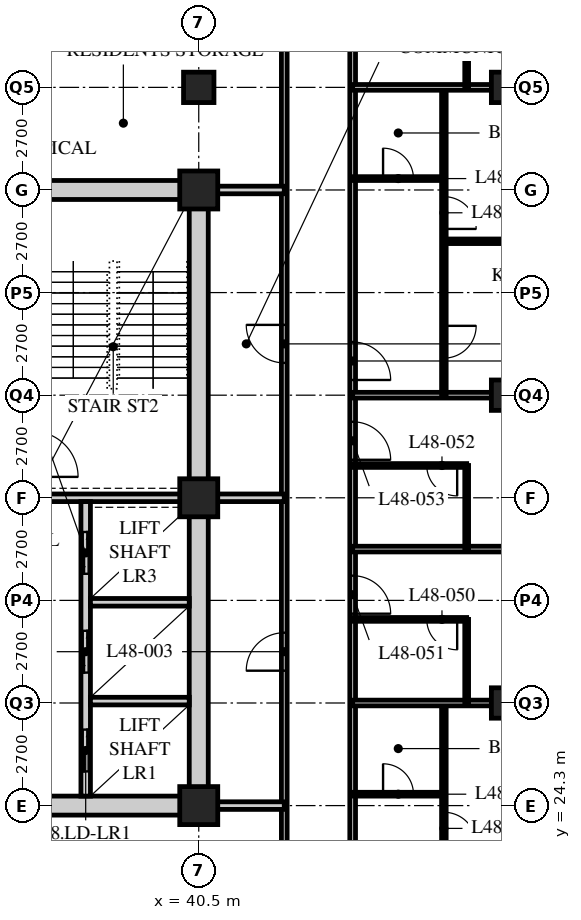
"""IFC4 building model, lengths in metres.
Left out: names, types, materials, properties, quantities, classifications, styles, units other than length and angle.
Written with IfcOpenShell. Run it as: python <this file> out.ifc"""

import sys

from ifc_helpers import new_model, si_unit, direction, frame, frame_2d, origin, origin_2d, place, context, subcontext, project, spatial, rectangle, hollow_rectangle, extrude, element, fill, save


model = new_model("IFC4")
c1 = context("Model", 3, precision=1e-05, world=origin(), true_north=direction((0.0, 1.0)))
c2 = subcontext(c1, "Body", "Model", "MODEL_VIEW")
j1 = project(units=[si_unit("LENGTHUNIT", "METRE"), si_unit("PLANEANGLEUNIT", "RADIAN")], contexts=[c1])
p1 = place(None, origin())
s1 = spatial("IfcSite", under=j1, at=p1, CompositionType="ELEMENT")
p2 = place(p1, origin())
s2 = spatial("IfcBuilding", under=s1, at=p2, CompositionType="ELEMENT")
p3 = place(p2, frame((0.0, 0.0, 188.4)))
s3 = spatial("IfcBuildingStorey", under=s2, at=p3, CompositionType="ELEMENT", Elevation=188.4)
for number, where, z_axis, x_axis in (
    (1, (40.5, 24.3, 0.0), (0.0, 0.0, 1.0), (1.0, 0.0, 0.0)),
    (2, (40.5, 32.4, 0.0), (0.0, 0.0, 1.0), (1.0, 0.0, 0.0)),
    (3, (40.5, 40.5, 0.0), (0.0, 0.0, 1.0), (1.0, 0.0, 0.0)),
):
    element("IfcColumn", number, at=place(p3, frame(where, z_axis=z_axis, x_axis=x_axis)), inside=s3, PredefinedType="COLUMN", context=c2, shape_type="SweptSolid", body=[
        extrude(hollow_rectangle(XDim=1.0, YDim=1.0, WallThickness=0.1, at=origin_2d()), origin(), (0.0, 0.0, 1.0), 3.6),
    ])
for number, where, z_axis, x_axis in (
    (4, (40.5, 43.2, 0.0), (0.0, 0.0, 1.0), (1.0, 0.0, 0.0)),
    (5, (48.6, 27.0, 0.0), (0.0, 0.0, 1.0), (1.0, 0.0, 0.0)),
    (6, (48.6, 35.1, 0.0), (0.0, 0.0, 1.0), (1.0, 0.0, 0.0)),
    (7, (48.6, 43.2, 0.0), (0.0, 0.0, 1.0), (1.0, 0.0, 0.0)),
):
    element("IfcColumn", number, at=place(p3, frame(where, z_axis=z_axis, x_axis=x_axis)), inside=s3, PredefinedType="COLUMN", context=c2, shape_type="SweptSolid", body=[
        extrude(hollow_rectangle(XDim=0.8, YDim=0.8, WallThickness=0.08, at=origin_2d()), origin(), (0.0, 0.0, 1.0), 3.6),
    ])
p4 = place(p3, frame((44.55, 18.9, 0.0), z_axis=(0.0, 0.0, 1.0), x_axis=(0.0, 1.0, 0.0)))
e8 = element("IfcWall", 8, at=p4, inside=s3, PredefinedType="PARTITIONING", context=c2, shape_type="SweptSolid", body=[
    extrude(rectangle(XDim=28.35, YDim=0.15, at=frame_2d((14.175, 0.0))), origin(), (0.0, 0.0, 1.0), 3.39),
])
p5 = place(p4, frame((0.4, 0.0, 0.0)))
e9 = element("IfcOpeningElement", 9, at=p5, cuts=e8, PredefinedType="OPENING", context=c2, shape_type="SweptSolid", body=[
    extrude(rectangle(XDim=1.0, YDim=2.1, at=frame_2d((0.5, 1.05))), frame((0.0, 0.085, 0.0), z_axis=(0.0, -1.0, 0.0), x_axis=(1.0, 0.0, 0.0)), (0.0, 0.0, 1.0), 0.17),
])
p6 = place(p4, frame((10.45, 0.0, 0.0)))
e10 = element("IfcOpeningElement", 10, at=p6, cuts=e8, PredefinedType="OPENING", context=c2, shape_type="SweptSolid", body=[
    extrude(rectangle(XDim=1.0, YDim=2.1, at=frame_2d((0.5, 1.05))), frame((0.0, 0.085, 0.0), z_axis=(0.0, -1.0, 0.0), x_axis=(1.0, 0.0, 0.0)), (0.0, 0.0, 1.0), 0.17),
])
p7 = place(p4, frame((14.5, 0.0, 0.0)))
e11 = element("IfcOpeningElement", 11, at=p7, cuts=e8, PredefinedType="OPENING", context=c2, shape_type="SweptSolid", body=[
    extrude(rectangle(XDim=1.0, YDim=2.1, at=frame_2d((0.5, 1.05))), frame((0.0, 0.085, 0.0), z_axis=(0.0, -1.0, 0.0), x_axis=(1.0, 0.0, 0.0)), (0.0, 0.0, 1.0), 0.17),
])
p8 = place(p4, frame((16.6, 0.0, 0.0)))
e12 = element("IfcOpeningElement", 12, at=p8, cuts=e8, PredefinedType="OPENING", context=c2, shape_type="SweptSolid", body=[
    extrude(rectangle(XDim=1.0, YDim=2.1, at=frame_2d((0.5, 1.05))), frame((0.0, 0.085, 0.0), z_axis=(0.0, -1.0, 0.0), x_axis=(1.0, 0.0, 0.0)), (0.0, 0.0, 1.0), 0.17),
])
p9 = place(p4, frame((26.65, 0.0, 0.0)))
e13 = element("IfcOpeningElement", 13, at=p9, cuts=e8, PredefinedType="OPENING", context=c2, shape_type="SweptSolid", body=[
    extrude(rectangle(XDim=1.0, YDim=2.1, at=frame_2d((0.5, 1.05))), frame((0.0, 0.085, 0.0), z_axis=(0.0, -1.0, 0.0), x_axis=(1.0, 0.0, 0.0)), (0.0, 0.0, 1.0), 0.17),
])
p10 = place(p3, frame((42.75, 20.7, 0.0), z_axis=(0.0, 0.0, 1.0), x_axis=(0.0, 1.0, 0.0)))
e14 = element("IfcWall", 14, at=p10, inside=s3, PredefinedType="PARTITIONING", context=c2, shape_type="SweptSolid", body=[
    extrude(rectangle(XDim=24.75, YDim=0.15, at=frame_2d((12.375, 0.0))), origin(), (0.0, 0.0, 1.0), 3.39),
])
p11 = place(p10, frame((7.15, 0.0, 0.0)))
e15 = element("IfcOpeningElement", 15, at=p11, cuts=e14, PredefinedType="OPENING", context=c2, shape_type="SweptSolid", body=[
    extrude(rectangle(XDim=1.0, YDim=2.1, at=frame_2d((0.5, 1.05))), frame((0.0, 0.085, 0.0), z_axis=(0.0, -1.0, 0.0), x_axis=(1.0, 0.0, 0.0)), (0.0, 0.0, 1.0), 0.17),
])
p12 = place(p10, frame((15.25, 0.0, 0.0)))
e16 = element("IfcOpeningElement", 16, at=p12, cuts=e14, PredefinedType="OPENING", context=c2, shape_type="SweptSolid", body=[
    extrude(rectangle(XDim=1.0, YDim=2.1, at=frame_2d((0.5, 1.05))), frame((0.0, 0.085, 0.0), z_axis=(0.0, -1.0, 0.0), x_axis=(1.0, 0.0, 0.0)), (0.0, 0.0, 1.0), 0.17),
])
for number, where, z_axis, x_axis in (
    (17, (40.5, 32.4, 0.0), (0.0, 0.0, 1.0), (1.0, 0.0, 0.0)),
    (18, (40.5, 24.3, 0.0), (0.0, 0.0, 1.0), (1.0, 0.0, 0.0)),
    (19, (40.5, 40.5, 0.0), (0.0, 0.0, 1.0), (1.0, 0.0, 0.0)),
):
    element("IfcWall", number, at=place(p3, frame(where, z_axis=z_axis, x_axis=x_axis)), inside=s3, PredefinedType="SOLIDWALL", context=c2, shape_type="SweptSolid", body=[
        extrude(rectangle(XDim=2.25, YDim=0.2, at=frame_2d((1.125, 0.0))), origin(), (0.0, 0.0, 1.0), 3.39),
    ])
p13 = place(p3, frame((46.95, 18.9, 0.0), z_axis=(0.0, 0.0, 1.0), x_axis=(0.0, 1.0, 0.0)))
e20 = element("IfcWall", 20, at=p13, inside=s3, PredefinedType="PARTITIONING", context=c2, shape_type="SweptSolid", body=[
    extrude(rectangle(XDim=8.1, YDim=0.12, at=frame_2d((4.05, 0.0))), origin(), (0.0, 0.0, 1.0), 3.39),
])
p14 = place(p13, frame((0.975, 0.0, 0.0)))
e21 = element("IfcOpeningElement", 21, at=p14, cuts=e20, PredefinedType="OPENING", context=c2, shape_type="SweptSolid", body=[
    extrude(rectangle(XDim=0.85, YDim=2.1, at=frame_2d((0.425, 1.05))), frame((0.0, 0.07, 0.0), z_axis=(0.0, -1.0, 0.0), x_axis=(1.0, 0.0, 0.0)), (0.0, 0.0, 1.0), 0.14),
])
p15 = place(p13, frame((4.375, 0.0, 0.0)))
e22 = element("IfcOpeningElement", 22, at=p15, cuts=e20, PredefinedType="OPENING", context=c2, shape_type="SweptSolid", body=[
    extrude(rectangle(XDim=0.85, YDim=2.1, at=frame_2d((0.425, 1.05))), frame((0.0, 0.07, 0.0), z_axis=(0.0, -1.0, 0.0), x_axis=(1.0, 0.0, 0.0)), (0.0, 0.0, 1.0), 0.14),
])
p16 = place(p3, frame((44.55, 24.6, 0.0), z_axis=(0.0, 0.0, 1.0), x_axis=(1.0, 0.0, 0.0)))
e23 = element("IfcWall", 23, at=p16, inside=s3, PredefinedType="PARTITIONING", context=c2, shape_type="SweptSolid", body=[
    extrude(rectangle(XDim=2.4, YDim=0.1, at=frame_2d((1.2, 0.0))), origin(), (0.0, 0.0, 1.0), 3.39),
])
p17 = place(p16, frame((0.8, 0.0, 0.0)))
e24 = element("IfcOpeningElement", 24, at=p17, cuts=e23, PredefinedType="OPENING", context=c2, shape_type="SweptSolid", body=[
    extrude(rectangle(XDim=0.8, YDim=2.1, at=frame_2d((0.4, 1.05))), frame((0.0, 0.06, 0.0), z_axis=(0.0, -1.0, 0.0), x_axis=(1.0, 0.0, 0.0)), (0.0, 0.0, 1.0), 0.12),
])
p18 = place(p3, frame((44.55, 27.0, 0.0), z_axis=(0.0, 0.0, 1.0), x_axis=(1.0, 0.0, 0.0)))
e25 = element("IfcWall", 25, at=p18, inside=s3, PredefinedType="PARTITIONING", context=c2, shape_type="SweptSolid", body=[
    extrude(rectangle(XDim=11.85, YDim=0.15, at=frame_2d((5.925, 0.0))), origin(), (0.0, 0.0, 1.0), 2.778),
])
p19 = place(p3, frame((47.55, 27.0, 0.0), z_axis=(0.0, 0.0, 1.0), x_axis=(0.0, 1.0, 0.0)))
e26 = element("IfcWall", 26, at=p19, inside=s3, PredefinedType="PARTITIONING", context=c2, shape_type="SweptSolid", body=[
    extrude(rectangle(XDim=2.2, YDim=0.1, at=frame_2d((1.1, 0.0))), origin(), (0.0, 0.0, 1.0), 3.39),
])
p20 = place(p3, frame((44.55, 29.2, 0.0), z_axis=(0.0, 0.0, 1.0), x_axis=(1.0, 0.0, 0.0)))
e27 = element("IfcWall", 27, at=p20, inside=s3, PredefinedType="PARTITIONING", context=c2, shape_type="SweptSolid", body=[
    extrude(rectangle(XDim=3.0, YDim=0.1, at=frame_2d((1.5, 0.0))), origin(), (0.0, 0.0, 1.0), 3.39),
])
p21 = place(p20, frame((1.95, 0.0, 0.0)))
e28 = element("IfcOpeningElement", 28, at=p21, cuts=e27, PredefinedType="OPENING", context=c2, shape_type="SweptSolid", body=[
    extrude(rectangle(XDim=0.8, YDim=2.1, at=frame_2d((0.4, 1.05))), frame((0.0, 0.06, 0.0), z_axis=(0.0, -1.0, 0.0), x_axis=(1.0, 0.0, 0.0)), (0.0, 0.0, 1.0), 0.12),
])
p22 = place(p3, frame((44.55, 31.05, 0.0), z_axis=(0.0, 0.0, 1.0), x_axis=(1.0, 0.0, 0.0)))
e29 = element("IfcWall", 29, at=p22, inside=s3, PredefinedType="PARTITIONING", context=c2, shape_type="SweptSolid", body=[
    extrude(rectangle(XDim=11.85, YDim=0.15, at=frame_2d((5.925, 0.0))), origin(), (0.0, 0.0, 1.0), 3.39),
])
p23 = place(p3, frame((47.55, 31.05, 0.0), z_axis=(0.0, 0.0, 1.0), x_axis=(0.0, 1.0, 0.0)))
e30 = element("IfcWall", 30, at=p23, inside=s3, PredefinedType="PARTITIONING", context=c2, shape_type="SweptSolid", body=[
    extrude(rectangle(XDim=2.2, YDim=0.1, at=frame_2d((1.1, 0.0))), origin(), (0.0, 0.0, 1.0), 3.39),
])
p24 = place(p3, frame((44.55, 33.25, 0.0), z_axis=(0.0, 0.0, 1.0), x_axis=(1.0, 0.0, 0.0)))
e31 = element("IfcWall", 31, at=p24, inside=s3, PredefinedType="PARTITIONING", context=c2, shape_type="SweptSolid", body=[
    extrude(rectangle(XDim=3.0, YDim=0.1, at=frame_2d((1.5, 0.0))), origin(), (0.0, 0.0, 1.0), 3.39),
])
p25 = place(p24, frame((1.95, 0.0, 0.0)))
e32 = element("IfcOpeningElement", 32, at=p25, cuts=e31, PredefinedType="OPENING", context=c2, shape_type="SweptSolid", body=[
    extrude(rectangle(XDim=0.8, YDim=2.1, at=frame_2d((0.4, 1.05))), frame((0.0, 0.06, 0.0), z_axis=(0.0, -1.0, 0.0), x_axis=(1.0, 0.0, 0.0)), (0.0, 0.0, 1.0), 0.12),
])
p26 = place(p3, frame((44.55, 35.1, 0.0), z_axis=(0.0, 0.0, 1.0), x_axis=(1.0, 0.0, 0.0)))
e33 = element("IfcWall", 33, at=p26, inside=s3, PredefinedType="PARTITIONING", context=c2, shape_type="SweptSolid", body=[
    extrude(rectangle(XDim=11.85, YDim=0.15, at=frame_2d((5.925, 0.0))), origin(), (0.0, 0.0, 1.0), 2.778),
])
p27 = place(p3, frame((46.95, 35.1, 0.0), z_axis=(0.0, 0.0, 1.0), x_axis=(0.0, 1.0, 0.0)))
e34 = element("IfcWall", 34, at=p27, inside=s3, PredefinedType="PARTITIONING", context=c2, shape_type="SweptSolid", body=[
    extrude(rectangle(XDim=8.1, YDim=0.12, at=frame_2d((4.05, 0.0))), origin(), (0.0, 0.0, 1.0), 3.39),
])
p28 = place(p27, frame((0.975, 0.0, 0.0)))
e35 = element("IfcOpeningElement", 35, at=p28, cuts=e34, PredefinedType="OPENING", context=c2, shape_type="SweptSolid", body=[
    extrude(rectangle(XDim=0.85, YDim=2.1, at=frame_2d((0.425, 1.05))), frame((0.0, 0.07, 0.0), z_axis=(0.0, -1.0, 0.0), x_axis=(1.0, 0.0, 0.0)), (0.0, 0.0, 1.0), 0.14),
])
p29 = place(p27, frame((4.375, 0.0, 0.0)))
e36 = element("IfcOpeningElement", 36, at=p29, cuts=e34, PredefinedType="OPENING", context=c2, shape_type="SweptSolid", body=[
    extrude(rectangle(XDim=0.85, YDim=2.1, at=frame_2d((0.425, 1.05))), frame((0.0, 0.07, 0.0), z_axis=(0.0, -1.0, 0.0), x_axis=(1.0, 0.0, 0.0)), (0.0, 0.0, 1.0), 0.14),
])
p30 = place(p3, frame((44.55, 40.8, 0.0), z_axis=(0.0, 0.0, 1.0), x_axis=(1.0, 0.0, 0.0)))
e37 = element("IfcWall", 37, at=p30, inside=s3, PredefinedType="PARTITIONING", context=c2, shape_type="SweptSolid", body=[
    extrude(rectangle(XDim=2.4, YDim=0.1, at=frame_2d((1.2, 0.0))), origin(), (0.0, 0.0, 1.0), 3.39),
])
p31 = place(p30, frame((0.8, 0.0, 0.0)))
e38 = element("IfcOpeningElement", 38, at=p31, cuts=e37, PredefinedType="OPENING", context=c2, shape_type="SweptSolid", body=[
    extrude(rectangle(XDim=0.8, YDim=2.1, at=frame_2d((0.4, 1.05))), frame((0.0, 0.06, 0.0), z_axis=(0.0, -1.0, 0.0), x_axis=(1.0, 0.0, 0.0)), (0.0, 0.0, 1.0), 0.12),
])
p32 = place(p3, frame((46.95, 39.15, 0.0), z_axis=(0.0, 0.0, 1.0), x_axis=(1.0, 0.0, 0.0)))
e39 = element("IfcWall", 39, at=p32, inside=s3, PredefinedType="PARTITIONING", context=c2, shape_type="SweptSolid", body=[
    extrude(rectangle(XDim=9.45, YDim=0.12, at=frame_2d((4.725, 0.0))), origin(), (0.0, 0.0, 1.0), 3.39),
])
p33 = place(p3, frame((44.55, 43.2, 0.0), z_axis=(0.0, 0.0, 1.0), x_axis=(1.0, 0.0, 0.0)))
e40 = element("IfcWall", 40, at=p33, inside=s3, PredefinedType="PARTITIONING", context=c2, shape_type="SweptSolid", body=[
    extrude(rectangle(XDim=11.85, YDim=0.15, at=frame_2d((5.925, 0.0))), origin(), (0.0, 0.0, 1.0), 2.778),
])
p34 = place(p3, frame((47.55, 43.2, 0.0), z_axis=(0.0, 0.0, 1.0), x_axis=(0.0, 1.0, 0.0)))
e41 = element("IfcWall", 41, at=p34, inside=s3, PredefinedType="PARTITIONING", context=c2, shape_type="SweptSolid", body=[
    extrude(rectangle(XDim=2.2, YDim=0.1, at=frame_2d((1.1, 0.0))), origin(), (0.0, 0.0, 1.0), 3.39),
])
p35 = place(p3, frame((15.95, 24.3, 0.0), z_axis=(0.0, 0.0, 1.0), x_axis=(1.0, 0.0, 0.0)))
e42 = element("IfcWall", 42, at=p35, inside=s3, PredefinedType="SOLIDWALL", context=c2, shape_type="SweptSolid", body=[
    extrude(rectangle(XDim=24.8, YDim=0.5, at=frame_2d((12.4, 0.0))), origin(), (0.0, 0.0, 1.0), 2.74),
])
p36 = place(p35, frame((11.5, 0.0, 0.0)))
e43 = element("IfcOpeningElement", 43, at=p36, cuts=e42, PredefinedType="OPENING", context=c2, shape_type="SweptSolid", body=[
    extrude(rectangle(XDim=1.8, YDim=2.4, at=frame_2d((0.9, 1.2))), frame((0.0, 0.26, 0.0), z_axis=(0.0, -1.0, 0.0), x_axis=(1.0, 0.0, 0.0)), (0.0, 0.0, 1.0), 0.52),
])
p37 = place(p3, frame((15.95, 40.5, 0.0), z_axis=(0.0, 0.0, 1.0), x_axis=(1.0, 0.0, 0.0)))
e44 = element("IfcWall", 44, at=p37, inside=s3, PredefinedType="SOLIDWALL", context=c2, shape_type="SweptSolid", body=[
    extrude(rectangle(XDim=24.8, YDim=0.5, at=frame_2d((12.4, 0.0))), origin(), (0.0, 0.0, 1.0), 2.74),
])
p38 = place(p37, frame((11.5, 0.0, 0.0)))
e45 = element("IfcOpeningElement", 45, at=p38, cuts=e44, PredefinedType="OPENING", context=c2, shape_type="SweptSolid", body=[
    extrude(rectangle(XDim=1.8, YDim=2.4, at=frame_2d((0.9, 1.2))), frame((0.0, 0.26, 0.0), z_axis=(0.0, -1.0, 0.0), x_axis=(1.0, 0.0, 0.0)), (0.0, 0.0, 1.0), 0.52),
])
p39 = place(p3, frame((40.5, 24.55, 0.0), z_axis=(0.0, 0.0, 1.0), x_axis=(0.0, 1.0, 0.0)))
e46 = element("IfcWall", 46, at=p39, inside=s3, PredefinedType="SOLIDWALL", context=c2, shape_type="SweptSolid", body=[
    extrude(rectangle(XDim=15.7, YDim=0.5, at=frame_2d((7.85, 0.0))), origin(), (0.0, 0.0, 1.0), 2.778),
])
p40 = place(p3, frame((32.3, 32.4, 0.0), z_axis=(0.0, 0.0, 1.0), x_axis=(1.0, 0.0, 0.0)))
e47 = element("IfcWall", 47, at=p40, inside=s3, PredefinedType="SOLIDWALL", context=c2, shape_type="SweptSolid", body=[
    extrude(rectangle(XDim=7.95, YDim=0.2, at=frame_2d((3.975, 0.0))), origin(), (0.0, 0.0, 1.0), 2.778),
])
p41 = place(p3, frame((37.525, 24.55, 0.0), z_axis=(0.0, 0.0, 1.0), x_axis=(0.0, 1.0, 0.0)))
e48 = element("IfcWall", 48, at=p41, inside=s3, PredefinedType="SOLIDWALL", context=c2, shape_type="SweptSolid", body=[
    extrude(rectangle(XDim=7.75, YDim=0.25, at=frame_2d((3.875, 0.0))), origin(), (0.0, 0.0, 1.0), 3.39),
])
p42 = place(p41, frame((0.65, 0.0, 0.0)))
e49 = element("IfcOpeningElement", 49, at=p42, cuts=e48, PredefinedType="OPENING", context=c2, shape_type="SweptSolid", body=[
    extrude(rectangle(XDim=1.1, YDim=2.4, at=frame_2d((0.55, 1.2))), frame((0.0, 0.135, 0.0), z_axis=(0.0, -1.0, 0.0), x_axis=(1.0, 0.0, 0.0)), (0.0, 0.0, 1.0), 0.27),
])
p43 = place(p41, frame((3.25, 0.0, 0.0)))
e50 = element("IfcOpeningElement", 50, at=p43, cuts=e48, PredefinedType="OPENING", context=c2, shape_type="SweptSolid", body=[
    extrude(rectangle(XDim=1.1, YDim=2.4, at=frame_2d((0.55, 1.2))), frame((0.0, 0.135, 0.0), z_axis=(0.0, -1.0, 0.0), x_axis=(1.0, 0.0, 0.0)), (0.0, 0.0, 1.0), 0.27),
])
p44 = place(p41, frame((5.85, 0.0, 0.0)))
e51 = element("IfcOpeningElement", 51, at=p44, cuts=e48, PredefinedType="OPENING", context=c2, shape_type="SweptSolid", body=[
    extrude(rectangle(XDim=1.1, YDim=2.4, at=frame_2d((0.55, 1.2))), frame((0.0, 0.135, 0.0), z_axis=(0.0, -1.0, 0.0), x_axis=(1.0, 0.0, 0.0)), (0.0, 0.0, 1.0), 0.27),
])
for number, where, z_axis, x_axis in (
    (52, (37.65, 27.05, 0.0), (0.0, 0.0, 1.0), (1.0, 0.0, 0.0)),
    (53, (37.65, 29.65, 0.0), (0.0, 0.0, 1.0), (1.0, 0.0, 0.0)),
):
    element("IfcWall", number, at=place(p3, frame(where, z_axis=z_axis, x_axis=x_axis)), inside=s3, PredefinedType="SOLIDWALL", context=c2, shape_type="SweptSolid", body=[
        extrude(rectangle(XDim=2.6, YDim=0.2, at=frame_2d((1.3, 0.0))), origin(), (0.0, 0.0, 1.0), 3.39),
    ])
p45 = place(p11, origin())
e54 = element("IfcDoor", 54, at=p45, inside=s3, OperationType="SINGLE_SWING_LEFT", PredefinedType="DOOR", context=c2, shape_type="SweptSolid", body=[
    extrude(rectangle(XDim=1.0, YDim=2.1, at=frame_2d((0.5, 1.05))), frame((0.0, 0.025, 0.0), z_axis=(0.0, -1.0, 0.0), x_axis=(1.0, 0.0, 0.0)), (0.0, 0.0, 1.0), 0.05),
])
fill(e15, e54)
p46 = place(p12, origin())
e55 = element("IfcDoor", 55, at=p46, inside=s3, OperationType="SINGLE_SWING_RIGHT", PredefinedType="DOOR", context=c2, shape_type="SweptSolid", body=[
    extrude(rectangle(XDim=1.0, YDim=2.1, at=frame_2d((0.5, 1.05))), frame((0.0, 0.025, 0.0), z_axis=(0.0, -1.0, 0.0), x_axis=(1.0, 0.0, 0.0)), (0.0, 0.0, 1.0), 0.05),
])
fill(e16, e55)
p47 = place(p17, origin())
e56 = element("IfcDoor", 56, at=p47, inside=s3, OperationType="SINGLE_SWING_LEFT", PredefinedType="DOOR", context=c2, shape_type="SweptSolid", body=[
    extrude(rectangle(XDim=0.8, YDim=2.1, at=frame_2d((0.4, 1.05))), frame((0.0, 0.025, 0.0), z_axis=(0.0, -1.0, 0.0), x_axis=(1.0, 0.0, 0.0)), (0.0, 0.0, 1.0), 0.05),
])
fill(e24, e56)
p48 = place(p15, origin())
e57 = element("IfcDoor", 57, at=p48, inside=s3, OperationType="SINGLE_SWING_RIGHT", PredefinedType="DOOR", context=c2, shape_type="SweptSolid", body=[
    extrude(rectangle(XDim=0.85, YDim=2.1, at=frame_2d((0.425, 1.05))), frame((0.0, 0.025, 0.0), z_axis=(0.0, -1.0, 0.0), x_axis=(1.0, 0.0, 0.0)), (0.0, 0.0, 1.0), 0.05),
])
fill(e22, e57)
p49 = place(p21, origin())
e58 = element("IfcDoor", 58, at=p49, inside=s3, OperationType="SINGLE_SWING_LEFT", PredefinedType="DOOR", context=c2, shape_type="SweptSolid", body=[
    extrude(rectangle(XDim=0.8, YDim=2.1, at=frame_2d((0.4, 1.05))), frame((0.0, 0.025, 0.0), z_axis=(0.0, -1.0, 0.0), x_axis=(1.0, 0.0, 0.0)), (0.0, 0.0, 1.0), 0.05),
])
fill(e28, e58)
p50 = place(p6, origin())
e59 = element("IfcDoor", 59, at=p50, inside=s3, OperationType="SINGLE_SWING_RIGHT", PredefinedType="DOOR", context=c2, shape_type="SweptSolid", body=[
    extrude(rectangle(XDim=1.0, YDim=2.1, at=frame_2d((0.5, 1.05))), frame((0.0, 0.025, 0.0), z_axis=(0.0, -1.0, 0.0), x_axis=(1.0, 0.0, 0.0)), (0.0, 0.0, 1.0), 0.05),
])
fill(e10, e59)
p51 = place(p25, origin())
e60 = element("IfcDoor", 60, at=p51, inside=s3, OperationType="SINGLE_SWING_LEFT", PredefinedType="DOOR", context=c2, shape_type="SweptSolid", body=[
    extrude(rectangle(XDim=0.8, YDim=2.1, at=frame_2d((0.4, 1.05))), frame((0.0, 0.025, 0.0), z_axis=(0.0, -1.0, 0.0), x_axis=(1.0, 0.0, 0.0)), (0.0, 0.0, 1.0), 0.05),
])
fill(e32, e60)
p52 = place(p7, origin())
e61 = element("IfcDoor", 61, at=p52, inside=s3, OperationType="SINGLE_SWING_RIGHT", PredefinedType="DOOR", context=c2, shape_type="SweptSolid", body=[
    extrude(rectangle(XDim=1.0, YDim=2.1, at=frame_2d((0.5, 1.05))), frame((0.0, 0.025, 0.0), z_axis=(0.0, -1.0, 0.0), x_axis=(1.0, 0.0, 0.0)), (0.0, 0.0, 1.0), 0.05),
])
fill(e11, e61)
p53 = place(p31, origin())
e62 = element("IfcDoor", 62, at=p53, inside=s3, OperationType="SINGLE_SWING_LEFT", PredefinedType="DOOR", context=c2, shape_type="SweptSolid", body=[
    extrude(rectangle(XDim=0.8, YDim=2.1, at=frame_2d((0.4, 1.05))), frame((0.0, 0.025, 0.0), z_axis=(0.0, -1.0, 0.0), x_axis=(1.0, 0.0, 0.0)), (0.0, 0.0, 1.0), 0.05),
])
fill(e38, e62)
p54 = place(p8, origin())
e63 = element("IfcDoor", 63, at=p54, inside=s3, OperationType="SINGLE_SWING_RIGHT", PredefinedType="DOOR", context=c2, shape_type="SweptSolid", body=[
    extrude(rectangle(XDim=1.0, YDim=2.1, at=frame_2d((0.5, 1.05))), frame((0.0, 0.025, 0.0), z_axis=(0.0, -1.0, 0.0), x_axis=(1.0, 0.0, 0.0)), (0.0, 0.0, 1.0), 0.05),
])
fill(e12, e63)
p55 = place(p28, origin())
e64 = element("IfcDoor", 64, at=p55, inside=s3, OperationType="SINGLE_SWING_LEFT", PredefinedType="DOOR", context=c2, shape_type="SweptSolid", body=[
    extrude(rectangle(XDim=0.85, YDim=2.1, at=frame_2d((0.425, 1.05))), frame((0.0, 0.025, 0.0), z_axis=(0.0, -1.0, 0.0), x_axis=(1.0, 0.0, 0.0)), (0.0, 0.0, 1.0), 0.05),
])
fill(e35, e64)
p56 = place(p29, origin())
e65 = element("IfcDoor", 65, at=p56, inside=s3, OperationType="SINGLE_SWING_RIGHT", PredefinedType="DOOR", context=c2, shape_type="SweptSolid", body=[
    extrude(rectangle(XDim=0.85, YDim=2.1, at=frame_2d((0.425, 1.05))), frame((0.0, 0.025, 0.0), z_axis=(0.0, -1.0, 0.0), x_axis=(1.0, 0.0, 0.0)), (0.0, 0.0, 1.0), 0.05),
])
fill(e36, e65)
p57 = place(p42, origin())
e66 = element("IfcDoor", 66, at=p57, inside=s3, OperationType="DOUBLE_DOOR_SLIDING", PredefinedType="DOOR", context=c2, shape_type="SweptSolid", body=[
    extrude(rectangle(XDim=1.1, YDim=2.4, at=frame_2d((0.55, 1.2))), frame((0.0, 0.025, 0.0), z_axis=(0.0, -1.0, 0.0), x_axis=(1.0, 0.0, 0.0)), (0.0, 0.0, 1.0), 0.05),
])
fill(e49, e66)
p58 = place(p43, origin())
e67 = element("IfcDoor", 67, at=p58, inside=s3, OperationType="DOUBLE_DOOR_SLIDING", PredefinedType="DOOR", context=c2, shape_type="SweptSolid", body=[
    extrude(rectangle(XDim=1.1, YDim=2.4, at=frame_2d((0.55, 1.2))), frame((0.0, 0.025, 0.0), z_axis=(0.0, -1.0, 0.0), x_axis=(1.0, 0.0, 0.0)), (0.0, 0.0, 1.0), 0.05),
])
fill(e50, e67)
p59 = place(p44, origin())
e68 = element("IfcDoor", 68, at=p59, inside=s3, OperationType="DOUBLE_DOOR_SLIDING", PredefinedType="DOOR", context=c2, shape_type="SweptSolid", body=[
    extrude(rectangle(XDim=1.1, YDim=2.4, at=frame_2d((0.55, 1.2))), frame((0.0, 0.025, 0.0), z_axis=(0.0, -1.0, 0.0), x_axis=(1.0, 0.0, 0.0)), (0.0, 0.0, 1.0), 0.05),
])
fill(e51, e68)
save(model, sys.argv[1])
